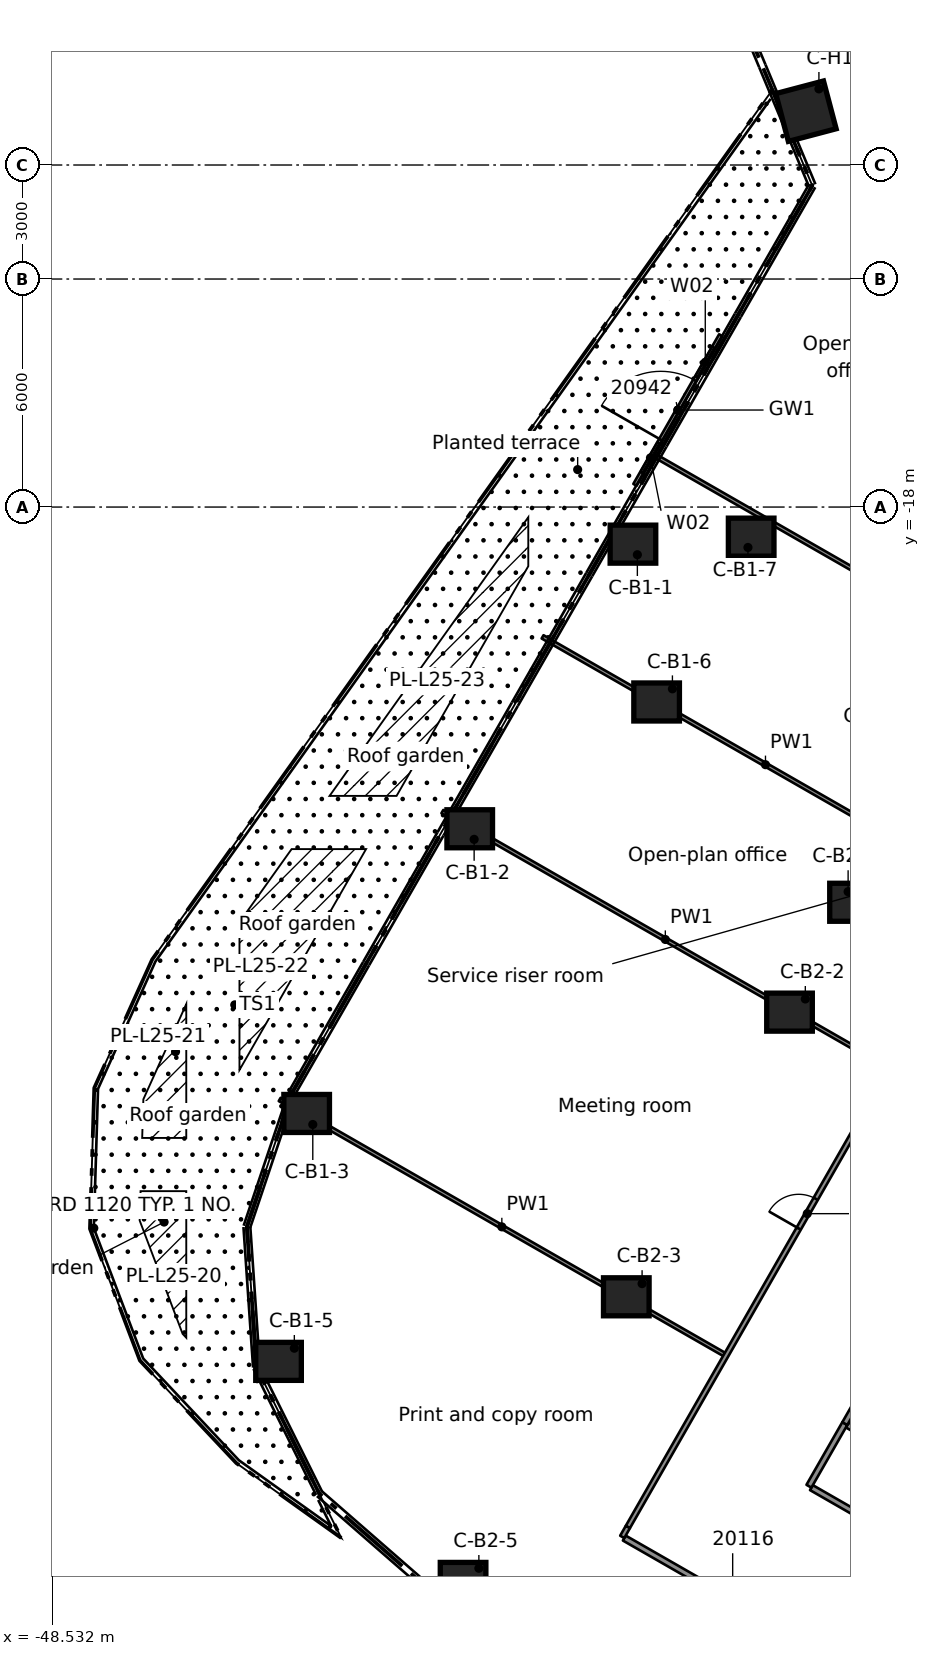
"""IFC4 building model, lengths in metres.
Left out: names, types, materials, properties, quantities, classifications, styles, units other than length and angle.
Written with IfcOpenShell. Run it as: python <this file> out.ifc"""

import sys

from ifc_helpers import new_model, si_unit, direction, frame, frame_2d, origin, origin_2d, place, context, subcontext, project, spatial, rectangle, extrude, element, fill, save


model = new_model("IFC4")
c1 = context("Model", 3, precision=1e-05, world=origin(), true_north=direction((0.0, 1.0)))
c2 = subcontext(c1, "Body", "Model", "MODEL_VIEW")
j1 = project(units=[si_unit("LENGTHUNIT", "METRE"), si_unit("PLANEANGLEUNIT", "RADIAN")], contexts=[c1])
p1 = place(None, origin())
s1 = spatial("IfcSite", under=j1, at=p1, CompositionType="ELEMENT")
p2 = place(p1, origin())
s2 = spatial("IfcBuilding", under=s1, at=p2, CompositionType="ELEMENT")
p3 = place(p2, frame((0.0, 0.0, 102.2)))
s3 = spatial("IfcBuildingStorey", under=s2, at=p3, CompositionType="ELEMENT", Elevation=102.2)
for number, where, z_axis, x_axis in (
    (1, (-33.246, -18.976, 0.0), (0.0, 0.0, 1.0), (1.0, 0.0, 0.0)),
    (2, (-37.541, -26.465, 0.0), (0.0, 0.0, 1.0), (1.0, 0.0, 0.0)),
    (3, (-41.832, -33.956, 0.0), (0.0, 0.0, 1.0), (1.0, 0.0, 0.0)),
    (4, (-42.572, -40.479, 0.0), (0.0, 0.0, 1.0), (1.0, 0.0, 0.0)),
    (5, (-32.623, -23.129, 0.0), (0.0, 0.0, 1.0), (1.0, 0.0, 0.0)),
    (6, (-30.135, -18.792, 0.0), (0.0, 0.0, 1.0), (1.0, 0.0, 0.0)),
    (7, (-29.126, -31.29, 0.0), (0.0, 0.0, 1.0), (1.0, 0.0, 0.0)),
    (8, (-33.421, -38.78, 0.0), (0.0, 0.0, 1.0), (1.0, 0.0, 0.0)),
    (9, (-37.716, -46.269, 0.0), (0.0, 0.0, 1.0), (1.0, 0.0, 0.0)),
    (10, (-27.468, -28.399, 0.0), (0.0, 0.0, 1.0), (1.0, 0.0, 0.0)),
):
    element("IfcColumn", number, at=place(p3, frame(where, z_axis=z_axis, x_axis=x_axis)), inside=s3, PredefinedType="COLUMN", context=c2, shape_type="SweptSolid", body=[
        extrude(rectangle(XDim=1.2, YDim=1.0, at=origin_2d()), origin(), (0.0, 0.0, 1.0), 3.5),
    ])
p4 = place(p3, frame((-28.694, -7.584, 0.0), z_axis=(0.0, 0.0, 1.0), x_axis=(-0.966801093075, -0.25553012822, 0.0)))
e11 = element("IfcColumn", 11, at=p4, inside=s3, PredefinedType="COLUMN", context=c2, shape_type="SweptSolid", body=[
    extrude(rectangle(XDim=1.3, YDim=1.3, at=origin_2d()), origin(), (0.0, 0.0, 1.0), 3.5),
])
p5 = place(p3, frame((-33.193, -17.416, 0.0), z_axis=(0.0, 0.0, 1.0), x_axis=(0.497482354019, 0.86747409612, 0.0)))
e12 = element("IfcWall", 12, at=p5, inside=s3, PredefinedType="STANDARD", context=c2, shape_type="SweptSolid", body=[
    extrude(rectangle(XDim=4.539, YDim=0.1, at=frame_2d((2.269, 0.0))), origin(), (0.0, 0.0, 1.0), 3.1),
])
p6 = place(p5, frame((1.369, 0.0, 0.0)))
e13 = element("IfcOpeningElement", 13, at=p6, cuts=e12, PredefinedType="OPENING", context=c2, shape_type="SweptSolid", body=[
    extrude(rectangle(XDim=1.8, YDim=2.4, at=frame_2d((0.9, 1.2))), frame((0.0, 0.06, 0.0), z_axis=(0.0, -1.0, 0.0), x_axis=(1.0, 0.0, 0.0)), (0.0, 0.0, 1.0), 0.12),
])
p7 = place(p5, frame((0.369, 0.0, 0.0)))
e14 = element("IfcOpeningElement", 14, at=p7, cuts=e12, PredefinedType="OPENING", context=c2, shape_type="SweptSolid", body=[
    extrude(rectangle(XDim=0.9, YDim=2.4, at=frame_2d((0.45, 1.2))), frame((0.0, 0.06, 0.0), z_axis=(0.0, -1.0, 0.0), x_axis=(1.0, 0.0, 0.0)), (0.0, 0.0, 1.0), 0.12),
])
p8 = place(p5, frame((3.269, 0.0, 0.0)))
e15 = element("IfcOpeningElement", 15, at=p8, cuts=e12, PredefinedType="OPENING", context=c2, shape_type="SweptSolid", body=[
    extrude(rectangle(XDim=0.9, YDim=2.4, at=frame_2d((0.45, 1.2))), frame((0.0, 0.06, 0.0), z_axis=(0.0, -1.0, 0.0), x_axis=(1.0, 0.0, 0.0)), (0.0, 0.0, 1.0), 0.12),
])
p9 = place(p3, frame((-22.059, -51.675, 0.0), z_axis=(0.0, 0.0, 1.0), x_axis=(-0.867448548379, 0.49752689969, 0.0)))
e16 = element("IfcWall", 16, at=p9, inside=s3, PredefinedType="PARTITIONING", context=c2, shape_type="SweptSolid", body=[
    extrude(rectangle(XDim=13.159, YDim=0.15, at=frame_2d((6.58, 0.0))), origin(), (0.0, 0.0, 1.0), 3.08),
])
p10 = place(p9, frame((2.772, 0.0, 0.0)))
e17 = element("IfcOpeningElement", 17, at=p10, cuts=e16, PredefinedType="OPENING", context=c2, shape_type="SweptSolid", body=[
    extrude(rectangle(XDim=0.9, YDim=2.1, at=frame_2d((0.45, 1.05))), frame((0.0, 0.085, 0.0), z_axis=(0.0, -1.0, 0.0), x_axis=(1.0, 0.0, 0.0)), (0.0, 0.0, 1.0), 0.17),
])
p11 = place(p9, frame((9.421, 0.0, 0.0)))
e18 = element("IfcOpeningElement", 18, at=p11, cuts=e16, PredefinedType="OPENING", context=c2, shape_type="SweptSolid", body=[
    extrude(rectangle(XDim=0.9, YDim=2.1, at=frame_2d((0.45, 1.05))), frame((0.0, 0.085, 0.0), z_axis=(0.0, -1.0, 0.0), x_axis=(1.0, 0.0, 0.0)), (0.0, 0.0, 1.0), 0.17),
])
p12 = place(p3, frame((-28.55, -43.801, 0.0), z_axis=(0.0, 0.0, 1.0), x_axis=(0.86725420263, -0.497865592325, 0.0)))
e19 = element("IfcWall", 19, at=p12, inside=s3, PredefinedType="PARTITIONING", context=c2, shape_type="SweptSolid", body=[
    extrude(rectangle(XDim=1.765, YDim=0.15, at=frame_2d((0.883, 0.0))), origin(), (0.0, 0.0, 1.0), 3.08),
])
p13 = place(p3, frame((-42.542, -33.587, 0.0), z_axis=(0.0, 0.0, 1.0), x_axis=(0.867443920759, -0.497534967956, 0.0)))
e20 = element("IfcWall", 20, at=p13, inside=s3, PredefinedType="PARTITIONING", context=c2, shape_type="SweptSolid", body=[
    extrude(rectangle(XDim=13.479, YDim=0.1, at=frame_2d((6.739, 0.0))), origin(), (0.0, 0.0, 1.0), 3.08),
])
p14 = place(p3, frame((-27.606, -42.153, 0.0), z_axis=(0.0, 0.0, 1.0), x_axis=(0.867464576118, -0.497498953949, 0.0)))
e21 = element("IfcWall", 21, at=p14, inside=s3, PredefinedType="PARTITIONING", context=c2, shape_type="SweptSolid", body=[
    extrude(rectangle(XDim=5.952, YDim=0.15, at=frame_2d((2.976, 0.0))), origin(), (0.0, 0.0, 1.0), 3.08),
])
p15 = place(p3, frame((-38.261, -26.013, 0.0), z_axis=(0.0, 0.0, 1.0), x_axis=(0.867449007851, -0.49752609859, 0.0)))
e22 = element("IfcWall", 22, at=p15, inside=s3, PredefinedType="PARTITIONING", context=c2, shape_type="SweptSolid", body=[
    extrude(rectangle(XDim=13.527, YDim=0.1, at=frame_2d((6.763, 0.0))), origin(), (0.0, 0.0, 1.0), 3.08),
])
p16 = place(p3, frame((-35.624, -21.415, 0.0), z_axis=(0.0, 0.0, 1.0), x_axis=(0.867457713736, -0.497510919358, 0.0)))
e23 = element("IfcWall", 23, at=p16, inside=s3, PredefinedType="PARTITIONING", context=c2, shape_type="SweptSolid", body=[
    extrude(rectangle(XDim=13.523, YDim=0.1, at=frame_2d((6.762, 0.0))), origin(), (0.0, 0.0, 1.0), 3.08),
])
p17 = place(p3, frame((-32.645, -16.662, 0.0), z_axis=(0.0, 0.0, 1.0), x_axis=(0.867516428304, -0.497408530911, 0.0)))
e24 = element("IfcWall", 24, at=p17, inside=s3, PredefinedType="PARTITIONING", context=c2, shape_type="SweptSolid", body=[
    extrude(rectangle(XDim=13.745, YDim=0.1, at=frame_2d((6.873, 0.0))), origin(), (0.0, 0.0, 1.0), 3.08),
])
p18 = place(p3, frame((-28.615, -43.764, 0.0), z_axis=(0.0, 0.0, 1.0), x_axis=(0.497093846187, 0.867696783492, 0.0)))
e25 = element("IfcWall", 25, at=p18, inside=s3, PredefinedType="PARTITIONING", context=c2, shape_type="SweptSolid", body=[
    extrude(rectangle(XDim=1.899, YDim=0.15, at=frame_2d((0.95, 0.0))), origin(), (0.0, 0.0, 1.0), 3.08),
])
p19 = place(p3, frame((-16.8, -23.128, 0.0), z_axis=(0.0, 0.0, 1.0), x_axis=(-0.496846554385, -0.867838407422, 0.0)))
e26 = element("IfcWall", 26, at=p19, inside=s3, PredefinedType="PARTITIONING", context=c2, shape_type="SweptSolid", body=[
    extrude(rectangle(XDim=21.88, YDim=0.15, at=frame_2d((10.94, 0.0))), origin(), (0.0, 0.0, 1.0), 3.08),
])
p20 = place(p19, frame((4.622, 0.0, 0.0)))
e27 = element("IfcOpeningElement", 27, at=p20, cuts=e26, PredefinedType="OPENING", context=c2, shape_type="SweptSolid", body=[
    extrude(rectangle(XDim=0.9, YDim=2.1, at=frame_2d((0.45, 1.05))), frame((0.0, 0.085, 0.0), z_axis=(0.0, -1.0, 0.0), x_axis=(1.0, 0.0, 0.0)), (0.0, 0.0, 1.0), 0.17),
])
p21 = place(p3, frame((-33.38, -44.837, 0.0), z_axis=(0.0, 0.0, 1.0), x_axis=(0.496890503853, 0.867813244414, 0.0)))
e28 = element("IfcWall", 28, at=p21, inside=s3, PredefinedType="PARTITIONING", context=c2, shape_type="SweptSolid", body=[
    extrude(rectangle(XDim=19.201, YDim=0.125, at=frame_2d((9.601, 0.0))), origin(), (0.0, 0.0, 1.0), 3.08),
])
p22 = place(p21, frame((16.0, 0.0, 0.0)))
e29 = element("IfcOpeningElement", 29, at=p22, cuts=e28, PredefinedType="OPENING", context=c2, shape_type="SweptSolid", body=[
    extrude(rectangle(XDim=1.1, YDim=2.1, at=frame_2d((0.55, 1.05))), frame((0.0, 0.073, 0.0), z_axis=(0.0, -1.0, 0.0), x_axis=(1.0, 0.0, 0.0)), (0.0, 0.0, 1.0), 0.145),
])
p23 = place(p21, frame((9.05, 0.0, 0.0)))
e30 = element("IfcOpeningElement", 30, at=p23, cuts=e28, PredefinedType="OPENING", context=c2, shape_type="SweptSolid", body=[
    extrude(rectangle(XDim=0.9, YDim=2.1, at=frame_2d((0.45, 1.05))), frame((0.0, 0.073, 0.0), z_axis=(0.0, -1.0, 0.0), x_axis=(1.0, 0.0, 0.0)), (0.0, 0.0, 1.0), 0.145),
])
p24 = place(p3, frame((-33.528, -45.097, 0.0), z_axis=(0.0, 0.0, 1.0), x_axis=(0.49517225761, 0.868794817718, 0.0)))
e31 = element("IfcWall", 31, at=p24, inside=s3, PredefinedType="PARTITIONING", context=c2, shape_type="SweptSolid", body=[
    extrude(rectangle(XDim=0.299, YDim=0.125, at=frame_2d((0.15, 0.0))), origin(), (0.0, 0.0, 1.0), 3.08),
])
p25 = place(p6, origin())
e32 = element("IfcDoor", 32, at=p25, inside=s3, OperationType="DOUBLE_DOOR_SINGLE_SWING", PredefinedType="DOOR", context=c2, shape_type="SweptSolid", body=[
    extrude(rectangle(XDim=1.8, YDim=2.4, at=frame_2d((0.9, 1.2))), frame((0.0, 0.025, 0.0), z_axis=(0.0, -1.0, 0.0), x_axis=(1.0, 0.0, 0.0)), (0.0, 0.0, 1.0), 0.05),
])
fill(e13, e32)
p26 = place(p7, origin())
e33 = element("IfcWindow", 33, at=p26, inside=s3, PartitioningType="SINGLE_PANEL", PredefinedType="WINDOW", context=c2, shape_type="SweptSolid", body=[
    extrude(rectangle(XDim=0.9, YDim=2.4, at=frame_2d((0.45, 1.2))), frame((0.0, 0.03, 0.0), z_axis=(0.0, -1.0, 0.0), x_axis=(1.0, 0.0, 0.0)), (0.0, 0.0, 1.0), 0.06),
])
fill(e14, e33)
p27 = place(p8, origin())
e34 = element("IfcWindow", 34, at=p27, inside=s3, PartitioningType="SINGLE_PANEL", PredefinedType="WINDOW", context=c2, shape_type="SweptSolid", body=[
    extrude(rectangle(XDim=0.9, YDim=2.4, at=frame_2d((0.45, 1.2))), frame((0.0, 0.03, 0.0), z_axis=(0.0, -1.0, 0.0), x_axis=(1.0, 0.0, 0.0)), (0.0, 0.0, 1.0), 0.06),
])
fill(e15, e34)
p28 = place(p23, origin())
e35 = element("IfcDoor", 35, at=p28, inside=s3, OperationType="SINGLE_SWING_LEFT", PredefinedType="DOOR", context=c2, shape_type="SweptSolid", body=[
    extrude(rectangle(XDim=0.9, YDim=2.1, at=frame_2d((0.45, 1.05))), frame((0.0, 0.025, 0.0), z_axis=(0.0, -1.0, 0.0), x_axis=(1.0, 0.0, 0.0)), (0.0, 0.0, 1.0), 0.05),
])
fill(e30, e35)
save(model, sys.argv[1])
